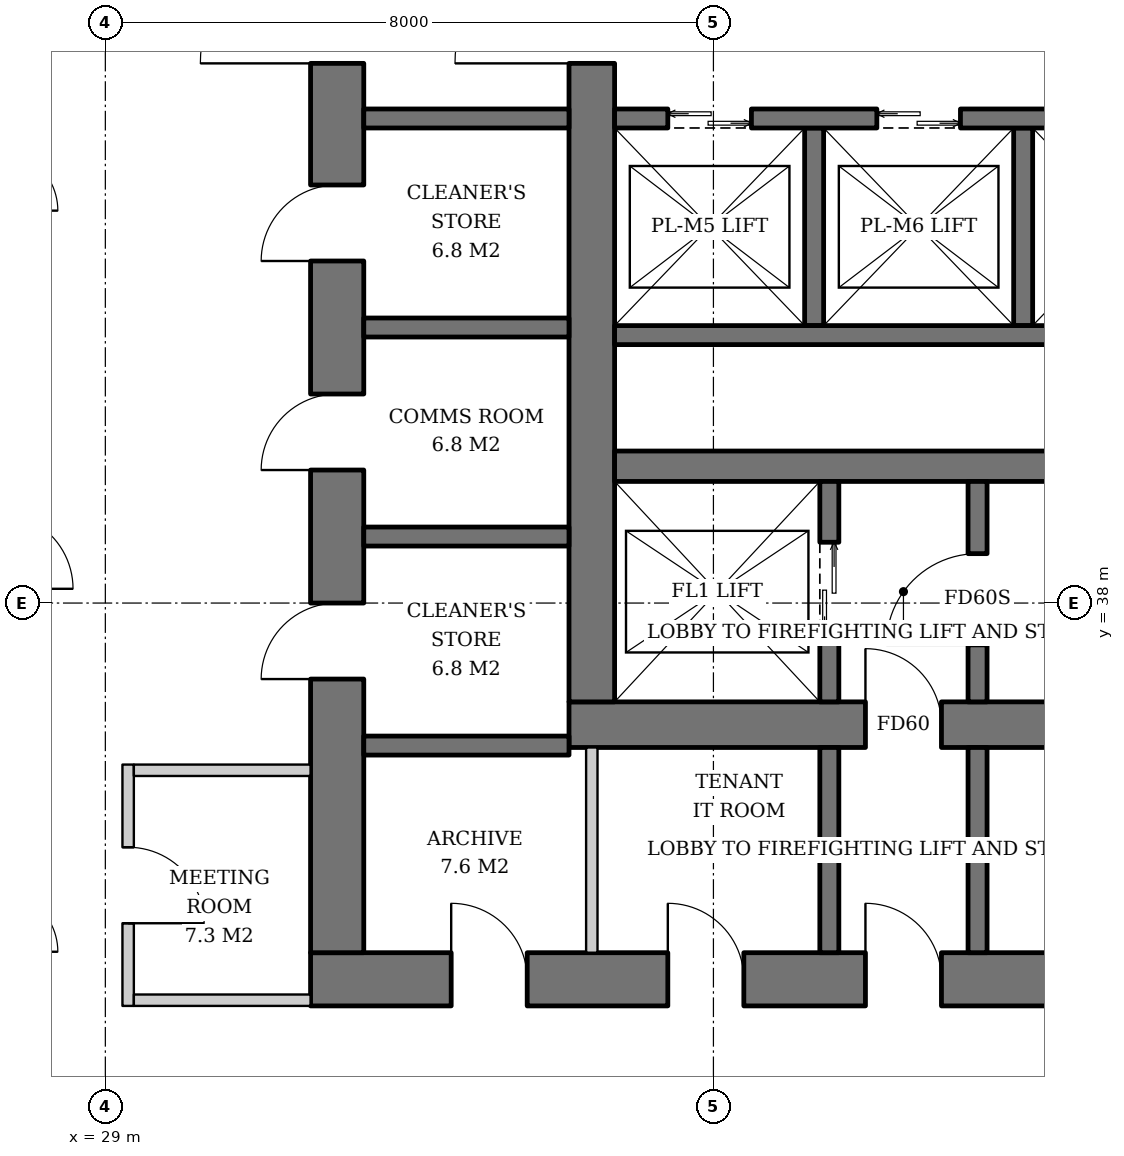
"""IFC4 building model, lengths in metres.
Left out: names, types, materials, properties, quantities, classifications, styles, units other than length and angle.
Written with IfcOpenShell. Run it as: python <this file> out.ifc"""

import sys

from ifc_helpers import new_model, si_unit, direction, frame, frame_2d, origin, place, context, subcontext, project, spatial, rectangle, extrude, element, fill, save


model = new_model("IFC4")
c1 = context("Model", 3, precision=1e-05, world=origin(), true_north=direction((0.0, 1.0)))
c2 = subcontext(c1, "Body", "Model", "MODEL_VIEW")
j1 = project(units=[si_unit("LENGTHUNIT", "METRE"), si_unit("PLANEANGLEUNIT", "RADIAN")], contexts=[c1])
p1 = place(None, origin())
s1 = spatial("IfcSite", under=j1, at=p1, CompositionType="ELEMENT")
p2 = place(p1, origin())
s2 = spatial("IfcBuilding", under=s1, at=p2, CompositionType="ELEMENT")
p3 = place(p2, frame((0.0, 0.0, 104.6)))
s3 = spatial("IfcBuildingStorey", under=s2, at=p3, CompositionType="ELEMENT", Elevation=104.6)
p4 = place(p3, frame((35.1, 36.4, 0.0), z_axis=(0.0, 0.0, 1.0), x_axis=(1.0, 0.0, 0.0)))
e1 = element("IfcWall", 1, at=p4, inside=s3, PredefinedType="SHEAR", context=c2, shape_type="SweptSolid", body=[
    extrude(rectangle(XDim=19.8, YDim=0.6, at=frame_2d((9.9, 0.0))), origin(), (0.0, 0.0, 1.0), 3.8),
])
p5 = place(p4, frame((3.9, 0.0, 0.0)))
e2 = element("IfcOpeningElement", 2, at=p5, cuts=e1, PredefinedType="OPENING", context=c2, shape_type="SweptSolid", body=[
    extrude(rectangle(XDim=1.0, YDim=2.1, at=frame_2d((0.5, 1.05))), frame((0.0, 0.31, 0.0), z_axis=(0.0, -1.0, 0.0), x_axis=(1.0, 0.0, 0.0)), (0.0, 0.0, 1.0), 0.62),
])
p6 = place(p4, frame((15.35, 0.0, 0.0)))
e3 = element("IfcOpeningElement", 3, at=p6, cuts=e1, PredefinedType="OPENING", context=c2, shape_type="SweptSolid", body=[
    extrude(rectangle(XDim=1.0, YDim=2.1, at=frame_2d((0.5, 1.05))), frame((0.0, 0.31, 0.0), z_axis=(0.0, -1.0, 0.0), x_axis=(1.0, 0.0, 0.0)), (0.0, 0.0, 1.0), 0.62),
])
p7 = place(p3, frame((35.4, 36.7, 0.0), z_axis=(0.0, 0.0, 1.0), x_axis=(0.0, 1.0, 0.0)))
e4 = element("IfcWall", 4, at=p7, inside=s3, PredefinedType="SHEAR", context=c2, shape_type="SweptSolid", body=[
    extrude(rectangle(XDim=18.6, YDim=0.6, at=frame_2d((9.3, 0.0))), origin(), (0.0, 0.0, 1.0), 3.8),
])
p8 = place(p7, frame((8.4, 0.0, 0.0)))
e5 = element("IfcOpeningElement", 5, at=p8, cuts=e4, PredefinedType="OPENING", context=c2, shape_type="SweptSolid", body=[
    extrude(rectangle(XDim=1.8, YDim=2.4, at=frame_2d((0.9, 1.2))), frame((0.0, 0.31, 0.0), z_axis=(0.0, -1.0, 0.0), x_axis=(1.0, 0.0, 0.0)), (0.0, 0.0, 1.0), 0.62),
])
p9 = place(p3, frame((31.7, 33.05, 0.0), z_axis=(0.0, 0.0, 1.0), x_axis=(1.0, 0.0, 0.0)))
e6 = element("IfcWall", 6, at=p9, inside=s3, PredefinedType="SHEAR", context=c2, shape_type="SweptSolid", body=[
    extrude(rectangle(XDim=26.6, YDim=0.7, at=frame_2d((13.3, 0.0))), origin(), (0.0, 0.0, 1.0), 3.8),
])
p10 = place(p9, frame((7.3, 0.0, 0.0)))
e7 = element("IfcOpeningElement", 7, at=p10, cuts=e6, PredefinedType="OPENING", context=c2, shape_type="SweptSolid", body=[
    extrude(rectangle(XDim=1.0, YDim=2.1, at=frame_2d((0.5, 1.05))), frame((0.0, 0.36, 0.0), z_axis=(0.0, -1.0, 0.0), x_axis=(1.0, 0.0, 0.0)), (0.0, 0.0, 1.0), 0.72),
])
p11 = place(p9, frame((18.75, 0.0, 0.0)))
e8 = element("IfcOpeningElement", 8, at=p11, cuts=e6, PredefinedType="OPENING", context=c2, shape_type="SweptSolid", body=[
    extrude(rectangle(XDim=1.0, YDim=2.1, at=frame_2d((0.5, 1.05))), frame((0.0, 0.36, 0.0), z_axis=(0.0, -1.0, 0.0), x_axis=(1.0, 0.0, 0.0)), (0.0, 0.0, 1.0), 0.72),
])
p12 = place(p9, frame((1.85, 0.0, 0.0)))
e9 = element("IfcOpeningElement", 9, at=p12, cuts=e6, PredefinedType="OPENING", context=c2, shape_type="SweptSolid", body=[
    extrude(rectangle(XDim=1.0, YDim=2.1, at=frame_2d((0.5, 1.05))), frame((0.0, 0.36, 0.0), z_axis=(0.0, -1.0, 0.0), x_axis=(1.0, 0.0, 0.0)), (0.0, 0.0, 1.0), 0.72),
])
p13 = place(p9, frame((4.7, 0.0, 0.0)))
e10 = element("IfcOpeningElement", 10, at=p13, cuts=e6, PredefinedType="OPENING", context=c2, shape_type="SweptSolid", body=[
    extrude(rectangle(XDim=1.0, YDim=2.1, at=frame_2d((0.5, 1.05))), frame((0.0, 0.36, 0.0), z_axis=(0.0, -1.0, 0.0), x_axis=(1.0, 0.0, 0.0)), (0.0, 0.0, 1.0), 0.72),
])
p14 = place(p9, frame((12.44, 0.0, 0.0)))
e11 = element("IfcOpeningElement", 11, at=p14, cuts=e6, PredefinedType="OPENING", context=c2, shape_type="SweptSolid", body=[
    extrude(rectangle(XDim=1.0, YDim=2.1, at=frame_2d((0.5, 1.05))), frame((0.0, 0.36, 0.0), z_axis=(0.0, -1.0, 0.0), x_axis=(1.0, 0.0, 0.0)), (0.0, 0.0, 1.0), 0.72),
])
p15 = place(p9, frame((20.644, 0.0, 0.0)))
e12 = element("IfcOpeningElement", 12, at=p15, cuts=e6, PredefinedType="OPENING", context=c2, shape_type="SweptSolid", body=[
    extrude(rectangle(XDim=1.0, YDim=2.1, at=frame_2d((0.5, 1.05))), frame((0.0, 0.36, 0.0), z_axis=(0.0, -1.0, 0.0), x_axis=(1.0, 0.0, 0.0)), (0.0, 0.0, 1.0), 0.72),
])
p16 = place(p9, frame((23.544, 0.0, 0.0)))
e13 = element("IfcOpeningElement", 13, at=p16, cuts=e6, PredefinedType="OPENING", context=c2, shape_type="SweptSolid", body=[
    extrude(rectangle(XDim=1.0, YDim=2.1, at=frame_2d((0.5, 1.05))), frame((0.0, 0.36, 0.0), z_axis=(0.0, -1.0, 0.0), x_axis=(1.0, 0.0, 0.0)), (0.0, 0.0, 1.0), 0.72),
])
p17 = place(p3, frame((32.05, 33.4, 0.0), z_axis=(0.0, 0.0, 1.0), x_axis=(0.0, 1.0, 0.0)))
e14 = element("IfcWall", 14, at=p17, inside=s3, PredefinedType="SHEAR", context=c2, shape_type="SweptSolid", body=[
    extrude(rectangle(XDim=25.2, YDim=0.7, at=frame_2d((12.6, 0.0))), origin(), (0.0, 0.0, 1.0), 3.8),
])
p18 = place(p17, frame((11.7, 0.0, 0.0)))
e15 = element("IfcOpeningElement", 15, at=p18, cuts=e14, PredefinedType="OPENING", context=c2, shape_type="SweptSolid", body=[
    extrude(rectangle(XDim=1.8, YDim=2.4, at=frame_2d((0.9, 1.2))), frame((0.0, 0.36, 0.0), z_axis=(0.0, -1.0, 0.0), x_axis=(1.0, 0.0, 0.0)), (0.0, 0.0, 1.0), 0.72),
])
p19 = place(p17, frame((3.6, 0.0, 0.0)))
e16 = element("IfcOpeningElement", 16, at=p19, cuts=e14, PredefinedType="OPENING", context=c2, shape_type="SweptSolid", body=[
    extrude(rectangle(XDim=1.0, YDim=2.1, at=frame_2d((0.5, 1.05))), frame((0.0, 0.36, 0.0), z_axis=(0.0, -1.0, 0.0), x_axis=(1.0, 0.0, 0.0)), (0.0, 0.0, 1.0), 0.72),
])
p20 = place(p17, frame((6.35, 0.0, 0.0)))
e17 = element("IfcOpeningElement", 17, at=p20, cuts=e14, PredefinedType="OPENING", context=c2, shape_type="SweptSolid", body=[
    extrude(rectangle(XDim=1.0, YDim=2.1, at=frame_2d((0.5, 1.05))), frame((0.0, 0.36, 0.0), z_axis=(0.0, -1.0, 0.0), x_axis=(1.0, 0.0, 0.0)), (0.0, 0.0, 1.0), 0.72),
])
p21 = place(p17, frame((9.1, 0.0, 0.0)))
e18 = element("IfcOpeningElement", 18, at=p21, cuts=e14, PredefinedType="OPENING", context=c2, shape_type="SweptSolid", body=[
    extrude(rectangle(XDim=1.0, YDim=2.1, at=frame_2d((0.5, 1.05))), frame((0.0, 0.36, 0.0), z_axis=(0.0, -1.0, 0.0), x_axis=(1.0, 0.0, 0.0)), (0.0, 0.0, 1.0), 0.72),
])
p22 = place(p17, frame((15.1, 0.0, 0.0)))
e19 = element("IfcOpeningElement", 19, at=p22, cuts=e14, PredefinedType="OPENING", context=c2, shape_type="SweptSolid", body=[
    extrude(rectangle(XDim=1.0, YDim=2.1, at=frame_2d((0.5, 1.05))), frame((0.0, 0.36, 0.0), z_axis=(0.0, -1.0, 0.0), x_axis=(1.0, 0.0, 0.0)), (0.0, 0.0, 1.0), 0.72),
])
p23 = place(p17, frame((17.85, 0.0, 0.0)))
e20 = element("IfcOpeningElement", 20, at=p23, cuts=e14, PredefinedType="OPENING", context=c2, shape_type="SweptSolid", body=[
    extrude(rectangle(XDim=1.0, YDim=2.1, at=frame_2d((0.5, 1.05))), frame((0.0, 0.36, 0.0), z_axis=(0.0, -1.0, 0.0), x_axis=(1.0, 0.0, 0.0)), (0.0, 0.0, 1.0), 0.72),
])
p24 = place(p3, frame((35.7, 39.8, 0.0), z_axis=(0.0, 0.0, 1.0), x_axis=(1.0, 0.0, 0.0)))
e21 = element("IfcWall", 21, at=p24, inside=s3, PredefinedType="SHEAR", context=c2, shape_type="SweptSolid", body=[
    extrude(rectangle(XDim=18.6, YDim=0.4, at=frame_2d((9.3, 0.0))), origin(), (0.0, 0.0, 1.0), 3.8),
])
p25 = place(p3, frame((38.525, 36.7, 0.0), z_axis=(0.0, 0.0, 1.0), x_axis=(0.0, 1.0, 0.0)))
e22 = element("IfcWall", 22, at=p25, inside=s3, PredefinedType="SHEAR", context=c2, shape_type="SweptSolid", body=[
    extrude(rectangle(XDim=2.9, YDim=0.25, at=frame_2d((1.45, 0.0))), origin(), (0.0, 0.0, 1.0), 3.8),
])
p26 = place(p25, frame((0.8, 0.0, 0.0)))
e23 = element("IfcOpeningElement", 23, at=p26, cuts=e22, PredefinedType="OPENING", context=c2, shape_type="SweptSolid", body=[
    extrude(rectangle(XDim=1.3, YDim=2.2, at=frame_2d((0.65, 1.1))), frame((0.0, 0.135, 0.0), z_axis=(0.0, -1.0, 0.0), x_axis=(1.0, 0.0, 0.0)), (0.0, 0.0, 1.0), 0.27),
])
p27 = place(p3, frame((40.475, 36.7, 0.0), z_axis=(0.0, 0.0, 1.0), x_axis=(0.0, 1.0, 0.0)))
e24 = element("IfcWall", 24, at=p27, inside=s3, PredefinedType="SHEAR", context=c2, shape_type="SweptSolid", body=[
    extrude(rectangle(XDim=2.9, YDim=0.25, at=frame_2d((1.45, 0.0))), origin(), (0.0, 0.0, 1.0), 3.8),
])
p28 = place(p27, frame((0.75, 0.0, 0.0)))
e25 = element("IfcOpeningElement", 25, at=p28, cuts=e24, PredefinedType="OPENING", context=c2, shape_type="SweptSolid", body=[
    extrude(rectangle(XDim=1.2, YDim=2.1, at=frame_2d((0.6, 1.05))), frame((0.0, 0.135, 0.0), z_axis=(0.0, -1.0, 0.0), x_axis=(1.0, 0.0, 0.0)), (0.0, 0.0, 1.0), 0.27),
])
for number, where, z_axis, x_axis in (
    (26, (38.325, 44.25, 0.0), (0.0, 0.0, 1.0), (0.0, -1.0, 0.0)),
    (27, (41.075, 44.25, 0.0), (0.0, 0.0, 1.0), (0.0, -1.0, 0.0)),
):
    element("IfcWall", number, at=place(p3, frame(where, z_axis=z_axis, x_axis=x_axis)), inside=s3, PredefinedType="SHEAR", context=c2, shape_type="SweptSolid", body=[
        extrude(rectangle(XDim=2.6, YDim=0.25, at=frame_2d((1.3, 0.0))), origin(), (0.0, 0.0, 1.0), 3.8),
    ])
p29 = place(p3, frame((35.7, 41.525, 0.0), z_axis=(0.0, 0.0, 1.0), x_axis=(1.0, 0.0, 0.0)))
e28 = element("IfcWall", 28, at=p29, inside=s3, PredefinedType="SHEAR", context=c2, shape_type="SweptSolid", body=[
    extrude(rectangle(XDim=11.0, YDim=0.25, at=frame_2d((5.5, 0.0))), origin(), (0.0, 0.0, 1.0), 3.8),
])
p30 = place(p3, frame((35.7, 44.375, 0.0), z_axis=(0.0, 0.0, 1.0), x_axis=(1.0, 0.0, 0.0)))
e29 = element("IfcWall", 29, at=p30, inside=s3, PredefinedType="SHEAR", context=c2, shape_type="SweptSolid", body=[
    extrude(rectangle(XDim=12.83, YDim=0.25, at=frame_2d((6.415, 0.0))), origin(), (0.0, 0.0, 1.0), 3.8),
])
p31 = place(p30, frame((0.7, 0.0, 0.0)))
e30 = element("IfcOpeningElement", 30, at=p31, cuts=e29, PredefinedType="OPENING", context=c2, shape_type="SweptSolid", body=[
    extrude(rectangle(XDim=1.1, YDim=2.2, at=frame_2d((0.55, 1.1))), frame((0.0, 0.135, 0.0), z_axis=(0.0, -1.0, 0.0), x_axis=(1.0, 0.0, 0.0)), (0.0, 0.0, 1.0), 0.27),
])
p32 = place(p30, frame((3.45, 0.0, 0.0)))
e31 = element("IfcOpeningElement", 31, at=p32, cuts=e29, PredefinedType="OPENING", context=c2, shape_type="SweptSolid", body=[
    extrude(rectangle(XDim=1.1, YDim=2.2, at=frame_2d((0.55, 1.1))), frame((0.0, 0.135, 0.0), z_axis=(0.0, -1.0, 0.0), x_axis=(1.0, 0.0, 0.0)), (0.0, 0.0, 1.0), 0.27),
])
p33 = place(p30, frame((6.2, 0.0, 0.0)))
e32 = element("IfcOpeningElement", 32, at=p33, cuts=e29, PredefinedType="OPENING", context=c2, shape_type="SweptSolid", body=[
    extrude(rectangle(XDim=1.1, YDim=2.2, at=frame_2d((0.55, 1.1))), frame((0.0, 0.135, 0.0), z_axis=(0.0, -1.0, 0.0), x_axis=(1.0, 0.0, 0.0)), (0.0, 0.0, 1.0), 0.27),
])
p34 = place(p30, frame((8.95, 0.0, 0.0)))
e33 = element("IfcOpeningElement", 33, at=p34, cuts=e29, PredefinedType="OPENING", context=c2, shape_type="SweptSolid", body=[
    extrude(rectangle(XDim=1.1, YDim=2.2, at=frame_2d((0.55, 1.1))), frame((0.0, 0.135, 0.0), z_axis=(0.0, -1.0, 0.0), x_axis=(1.0, 0.0, 0.0)), (0.0, 0.0, 1.0), 0.27),
])
p35 = place(p30, frame((11.515, 0.0, 0.0)))
e34 = element("IfcOpeningElement", 34, at=p35, cuts=e29, PredefinedType="OPENING", context=c2, shape_type="SweptSolid", body=[
    extrude(rectangle(XDim=0.8, YDim=2.0, at=frame_2d((0.4, 1.0))), frame((0.0, 0.135, 0.0), z_axis=(0.0, -1.0, 0.0), x_axis=(1.0, 0.0, 0.0)), (0.0, 0.0, 1.0), 0.27),
])
for number, where, z_axis, x_axis in (
    (35, (32.4, 36.125, 0.0), (0.0, 0.0, 1.0), (1.0, 0.0, 0.0)),
    (36, (32.4, 38.875, 0.0), (0.0, 0.0, 1.0), (1.0, 0.0, 0.0)),
    (37, (32.4, 41.625, 0.0), (0.0, 0.0, 1.0), (1.0, 0.0, 0.0)),
    (38, (32.4, 44.375, 0.0), (0.0, 0.0, 1.0), (1.0, 0.0, 0.0)),
):
    element("IfcWall", number, at=place(p3, frame(where, z_axis=z_axis, x_axis=x_axis)), inside=s3, PredefinedType="SHEAR", context=c2, shape_type="SweptSolid", body=[
        extrude(rectangle(XDim=2.7, YDim=0.25, at=frame_2d((1.35, 0.0))), origin(), (0.0, 0.0, 1.0), 3.8),
    ])
for number, where, z_axis, x_axis in (
    (39, (38.525, 33.4, 0.0), (0.0, 0.0, 1.0), (0.0, 1.0, 0.0)),
    (40, (40.475, 33.4, 0.0), (0.0, 0.0, 1.0), (0.0, 1.0, 0.0)),
):
    element("IfcWall", number, at=place(p3, frame(where, z_axis=z_axis, x_axis=x_axis)), inside=s3, PredefinedType="SOLIDWALL", context=c2, shape_type="SweptSolid", body=[
        extrude(rectangle(XDim=2.7, YDim=0.25, at=frame_2d((1.35, 0.0))), origin(), (0.0, 0.0, 1.0), 3.62),
    ])
p36 = place(p3, frame((35.4, 33.4, 0.0), z_axis=(0.0, 0.0, 1.0), x_axis=(0.0, 1.0, 0.0)))
e41 = element("IfcWall", 41, at=p36, inside=s3, PredefinedType="SOLIDWALL", context=c2, shape_type="SweptSolid", body=[
    extrude(rectangle(XDim=2.7, YDim=0.15, at=frame_2d((1.35, 0.0))), origin(), (0.0, 0.0, 1.0), 3.62),
])
p37 = place(p3, frame((29.3, 35.875, 0.0), z_axis=(0.0, 0.0, 1.0), x_axis=(0.0, -1.0, 0.0)))
e42 = element("IfcWall", 42, at=p37, inside=s3, PredefinedType="PARTITIONING", context=c2, shape_type="SweptSolid", body=[
    extrude(rectangle(XDim=3.175, YDim=0.15, at=frame_2d((1.587, 0.0))), origin(), (0.0, 0.0, 1.0), 3.62),
])
p38 = place(p37, frame((1.087, 0.0, 0.0)))
e43 = element("IfcOpeningElement", 43, at=p38, cuts=e42, PredefinedType="OPENING", context=c2, shape_type="SweptSolid", body=[
    extrude(rectangle(XDim=1.0, YDim=2.1, at=frame_2d((0.5, 1.05))), frame((0.0, 0.085, 0.0), z_axis=(0.0, -1.0, 0.0), x_axis=(1.0, 0.0, 0.0)), (0.0, 0.0, 1.0), 0.17),
])
for number, where, z_axis, x_axis in (
    (44, (31.7, 35.8, 0.0), (0.0, 0.0, 1.0), (-1.0, 0.0, 0.0)),
    (45, (31.7, 32.775, 0.0), (0.0, 0.0, 1.0), (-1.0, 0.0, 0.0)),
):
    element("IfcWall", number, at=place(p3, frame(where, z_axis=z_axis, x_axis=x_axis)), inside=s3, PredefinedType="PARTITIONING", context=c2, shape_type="SweptSolid", body=[
        extrude(rectangle(XDim=2.325, YDim=0.15, at=frame_2d((1.163, 0.0))), origin(), (0.0, 0.0, 1.0), 3.62),
    ])
p39 = place(p26, origin())
e46 = element("IfcDoor", 46, at=p39, inside=s3, OperationType="DOUBLE_DOOR_SLIDING", PredefinedType="DOOR", context=c2, shape_type="SweptSolid", body=[
    extrude(rectangle(XDim=1.3, YDim=2.2, at=frame_2d((0.65, 1.1))), frame((0.0, 0.025, 0.0), z_axis=(0.0, -1.0, 0.0), x_axis=(1.0, 0.0, 0.0)), (0.0, 0.0, 1.0), 0.05),
])
fill(e23, e46)
p40 = place(p28, origin())
e47 = element("IfcDoor", 47, at=p40, inside=s3, OperationType="SINGLE_SWING_LEFT", PredefinedType="DOOR", context=c2, shape_type="SweptSolid", body=[
    extrude(rectangle(XDim=1.2, YDim=2.1, at=frame_2d((0.6, 1.05))), frame((0.0, 0.025, 0.0), z_axis=(0.0, -1.0, 0.0), x_axis=(1.0, 0.0, 0.0)), (0.0, 0.0, 1.0), 0.05),
])
fill(e25, e47)
p41 = place(p31, origin())
e48 = element("IfcDoor", 48, at=p41, inside=s3, OperationType="DOUBLE_DOOR_SLIDING", PredefinedType="DOOR", context=c2, shape_type="SweptSolid", body=[
    extrude(rectangle(XDim=1.1, YDim=2.2, at=frame_2d((0.55, 1.1))), frame((0.0, 0.025, 0.0), z_axis=(0.0, -1.0, 0.0), x_axis=(1.0, 0.0, 0.0)), (0.0, 0.0, 1.0), 0.05),
])
fill(e30, e48)
p42 = place(p32, origin())
e49 = element("IfcDoor", 49, at=p42, inside=s3, OperationType="DOUBLE_DOOR_SLIDING", PredefinedType="DOOR", context=c2, shape_type="SweptSolid", body=[
    extrude(rectangle(XDim=1.1, YDim=2.2, at=frame_2d((0.55, 1.1))), frame((0.0, 0.025, 0.0), z_axis=(0.0, -1.0, 0.0), x_axis=(1.0, 0.0, 0.0)), (0.0, 0.0, 1.0), 0.05),
])
fill(e31, e49)
p43 = place(p5, origin())
e50 = element("IfcDoor", 50, at=p43, inside=s3, OperationType="SINGLE_SWING_LEFT", PredefinedType="DOOR", context=c2, shape_type="SweptSolid", body=[
    extrude(rectangle(XDim=1.0, YDim=2.1, at=frame_2d((0.5, 1.05))), frame((0.0, 0.025, 0.0), z_axis=(0.0, -1.0, 0.0), x_axis=(1.0, 0.0, 0.0)), (0.0, 0.0, 1.0), 0.05),
])
fill(e2, e50)
p44 = place(p8, origin())
e51 = element("IfcDoor", 51, at=p44, inside=s3, OperationType="DOUBLE_DOOR_SINGLE_SWING", PredefinedType="DOOR", context=c2, shape_type="SweptSolid", body=[
    extrude(rectangle(XDim=1.8, YDim=2.4, at=frame_2d((0.9, 1.2))), frame((0.0, 0.025, 0.0), z_axis=(0.0, -1.0, 0.0), x_axis=(1.0, 0.0, 0.0)), (0.0, 0.0, 1.0), 0.05),
])
fill(e5, e51)
p45 = place(p18, origin())
e52 = element("IfcDoor", 52, at=p45, inside=s3, OperationType="DOUBLE_DOOR_SINGLE_SWING", PredefinedType="DOOR", context=c2, shape_type="SweptSolid", body=[
    extrude(rectangle(XDim=1.8, YDim=2.4, at=frame_2d((0.9, 1.2))), frame((0.0, 0.025, 0.0), z_axis=(0.0, -1.0, 0.0), x_axis=(1.0, 0.0, 0.0)), (0.0, 0.0, 1.0), 0.05),
])
fill(e15, e52)
p46 = place(p10, origin())
e53 = element("IfcDoor", 53, at=p46, inside=s3, OperationType="SINGLE_SWING_LEFT", PredefinedType="DOOR", context=c2, shape_type="SweptSolid", body=[
    extrude(rectangle(XDim=1.0, YDim=2.1, at=frame_2d((0.5, 1.05))), frame((0.0, 0.025, 0.0), z_axis=(0.0, -1.0, 0.0), x_axis=(1.0, 0.0, 0.0)), (0.0, 0.0, 1.0), 0.05),
])
fill(e7, e53)
p47 = place(p19, origin())
e54 = element("IfcDoor", 54, at=p47, inside=s3, OperationType="SINGLE_SWING_LEFT", PredefinedType="DOOR", context=c2, shape_type="SweptSolid", body=[
    extrude(rectangle(XDim=1.0, YDim=2.1, at=frame_2d((0.5, 1.05))), frame((0.0, -0.29, 0.0), z_axis=(0.0, -1.0, 0.0), x_axis=(1.0, 0.0, 0.0)), (0.0, 0.0, 1.0), 0.05),
])
fill(e16, e54)
p48 = place(p20, origin())
e55 = element("IfcDoor", 55, at=p48, inside=s3, OperationType="SINGLE_SWING_LEFT", PredefinedType="DOOR", context=c2, shape_type="SweptSolid", body=[
    extrude(rectangle(XDim=1.0, YDim=2.1, at=frame_2d((0.5, 1.05))), frame((0.0, -0.29, 0.0), z_axis=(0.0, -1.0, 0.0), x_axis=(1.0, 0.0, 0.0)), (0.0, 0.0, 1.0), 0.05),
])
fill(e17, e55)
p49 = place(p21, origin())
e56 = element("IfcDoor", 56, at=p49, inside=s3, OperationType="SINGLE_SWING_LEFT", PredefinedType="DOOR", context=c2, shape_type="SweptSolid", body=[
    extrude(rectangle(XDim=1.0, YDim=2.1, at=frame_2d((0.5, 1.05))), frame((0.0, -0.29, 0.0), z_axis=(0.0, -1.0, 0.0), x_axis=(1.0, 0.0, 0.0)), (0.0, 0.0, 1.0), 0.05),
])
fill(e18, e56)
p50 = place(p12, origin())
e57 = element("IfcDoor", 57, at=p50, inside=s3, OperationType="SINGLE_SWING_LEFT", PredefinedType="DOOR", context=c2, shape_type="SweptSolid", body=[
    extrude(rectangle(XDim=1.0, YDim=2.1, at=frame_2d((0.5, 1.05))), frame((0.0, 0.34, 0.0), z_axis=(0.0, -1.0, 0.0), x_axis=(1.0, 0.0, 0.0)), (0.0, 0.0, 1.0), 0.05),
])
fill(e9, e57)
p51 = place(p13, origin())
e58 = element("IfcDoor", 58, at=p51, inside=s3, OperationType="SINGLE_SWING_LEFT", PredefinedType="DOOR", context=c2, shape_type="SweptSolid", body=[
    extrude(rectangle(XDim=1.0, YDim=2.1, at=frame_2d((0.5, 1.05))), frame((0.0, 0.34, 0.0), z_axis=(0.0, -1.0, 0.0), x_axis=(1.0, 0.0, 0.0)), (0.0, 0.0, 1.0), 0.05),
])
fill(e10, e58)
p52 = place(p38, origin())
e59 = element("IfcDoor", 59, at=p52, inside=s3, OperationType="SINGLE_SWING_RIGHT", PredefinedType="DOOR", context=c2, shape_type="SweptSolid", body=[
    extrude(rectangle(XDim=1.0, YDim=2.1, at=frame_2d((0.5, 1.05))), frame((0.0, 0.025, 0.0), z_axis=(0.0, -1.0, 0.0), x_axis=(1.0, 0.0, 0.0)), (0.0, 0.0, 1.0), 0.05),
])
fill(e43, e59)
save(model, sys.argv[1])
